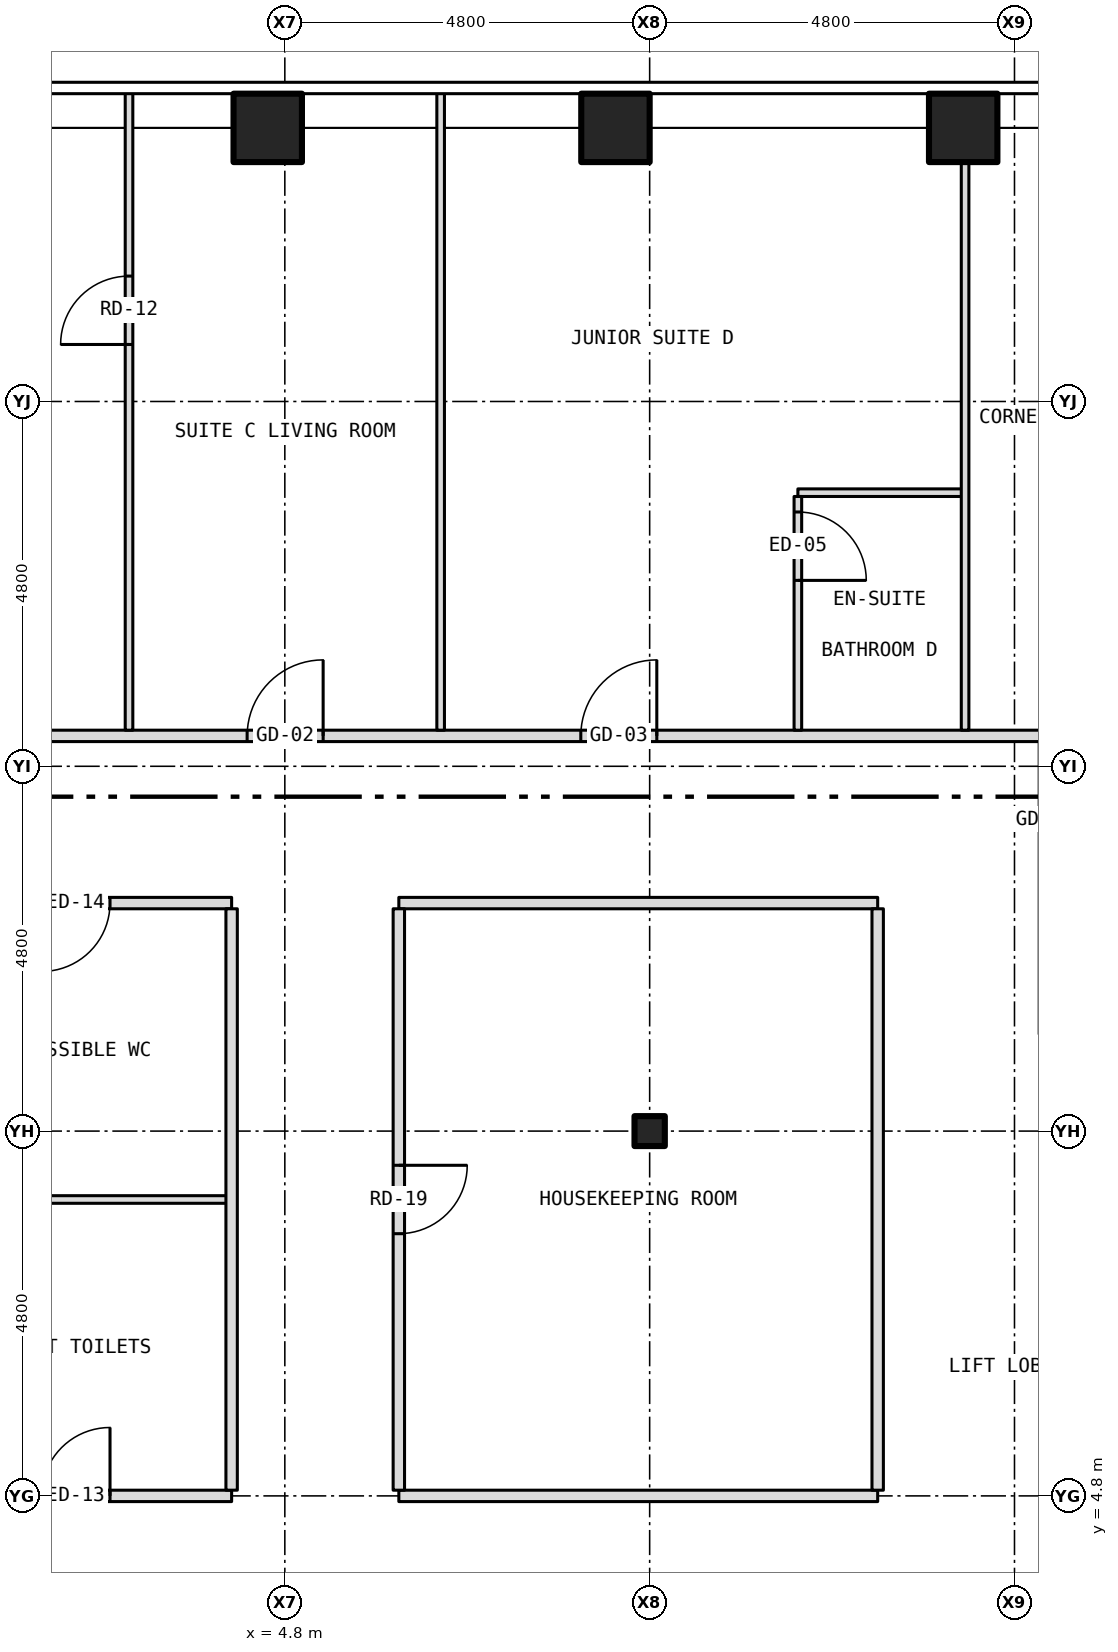
"""IFC4 building model, lengths in metres.
Left out: names, types, materials, properties, quantities, classifications, styles, units other than length and angle.
Written with IfcOpenShell. Run it as: python <this file> out.ifc"""

import sys

from ifc_helpers import new_model, si_unit, direction, frame, frame_2d, origin, origin_2d, place, context, subcontext, project, spatial, rectangle, hollow_rectangle, i_section, extrude, element, fill, save


model = new_model("IFC4")
c1 = context("Model", 3, precision=1e-05, world=origin(), true_north=direction((0.0, 1.0)))
c2 = subcontext(c1, "Body", "Model", "MODEL_VIEW")
j1 = project(units=[si_unit("LENGTHUNIT", "METRE"), si_unit("PLANEANGLEUNIT", "RADIAN")], contexts=[c1])
p1 = place(None, origin())
s1 = spatial("IfcSite", under=j1, at=p1, CompositionType="ELEMENT")
p2 = place(p1, origin())
s2 = spatial("IfcBuilding", under=s1, at=p2, CompositionType="ELEMENT")
p3 = place(p2, frame((0.0, 0.0, 110.0)))
s3 = spatial("IfcBuildingStorey", under=s2, at=p3, CompositionType="ELEMENT", Elevation=110.0)
for number, where, z_axis, x_axis in (
    (1, (4.575, 22.8, -0.15), (0.0, 0.0, 1.0), (1.0, 0.0, 0.0)),
    (2, (9.15, 22.8, -0.15), (0.0, 0.0, 1.0), (1.0, 0.0, 0.0)),
    (3, (13.725, 22.8, -0.15), (0.0, 0.0, 1.0), (1.0, 0.0, 0.0)),
):
    element("IfcColumn", number, at=place(p3, frame(where, z_axis=z_axis, x_axis=x_axis)), inside=s3, PredefinedType="COLUMN", context=c2, shape_type="SweptSolid", body=[
        extrude(hollow_rectangle(XDim=0.9, YDim=0.9, WallThickness=0.05, at=origin_2d()), origin(), (0.0, 0.0, 1.0), 3.5),
    ])
p4 = place(p3, frame((9.6, 9.6, -0.15), z_axis=(0.0, 0.0, 1.0), x_axis=(1.0, 0.0, 0.0)))
e4 = element("IfcColumn", 4, at=p4, inside=s3, PredefinedType="COLUMN", context=c2, shape_type="SweptSolid", body=[
    extrude(i_section(OverallWidth=0.399, OverallDepth=0.394, WebThickness=0.023, FlangeThickness=0.037, at=origin_2d()), origin(), (0.0, 0.0, 1.0), 3.5),
])
p5 = place(p3, frame((-12.6, 4.8, 0.0), z_axis=(0.0, 0.0, 1.0), x_axis=(1.0, 0.0, 0.0)))
e5 = element("IfcWall", 5, at=p5, inside=s3, PredefinedType="PARTITIONING", context=c2, shape_type="SweptSolid", body=[
    extrude(rectangle(XDim=16.7, YDim=0.15, at=frame_2d((8.35, 0.0))), origin(), (0.0, 0.0, 1.0), 3.35),
])
p6 = place(p5, frame((14.2, 0.0, 0.0)))
e6 = element("IfcOpeningElement", 6, at=p6, cuts=e5, PredefinedType="OPENING", context=c2, shape_type="SweptSolid", body=[
    extrude(rectangle(XDim=0.9, YDim=2.1, at=frame_2d((0.45, 1.05))), frame((0.0, 0.087, 0.0), z_axis=(0.0, -1.0, 0.0), x_axis=(1.0, 0.0, 0.0)), (0.0, 0.0, 1.0), 0.174),
])
p7 = place(p3, frame((6.3, 4.8, 0.0), z_axis=(0.0, 0.0, 1.0), x_axis=(1.0, 0.0, 0.0)))
e7 = element("IfcWall", 7, at=p7, inside=s3, PredefinedType="PARTITIONING", context=c2, shape_type="SweptSolid", body=[
    extrude(rectangle(XDim=6.3, YDim=0.15, at=frame_2d((3.15, 0.0))), origin(), (0.0, 0.0, 1.0), 3.35),
])
p8 = place(p3, frame((0.0, 8.7, 0.0), z_axis=(0.0, 0.0, 1.0), x_axis=(1.0, 0.0, 0.0)))
e8 = element("IfcWall", 8, at=p8, inside=s3, PredefinedType="PARTITIONING", context=c2, shape_type="SweptSolid", body=[
    extrude(rectangle(XDim=4.1, YDim=0.1, at=frame_2d((2.05, 0.0))), origin(), (0.0, 0.0, 1.0), 3.35),
])
p9 = place(p3, frame((-12.6, 12.6, 0.0), z_axis=(0.0, 0.0, 1.0), x_axis=(1.0, 0.0, 0.0)))
e9 = element("IfcWall", 9, at=p9, inside=s3, PredefinedType="PARTITIONING", context=c2, shape_type="SweptSolid", body=[
    extrude(rectangle(XDim=16.7, YDim=0.15, at=frame_2d((8.35, 0.0))), origin(), (0.0, 0.0, 1.0), 3.35),
])
p10 = place(p9, frame((14.2, 0.0, 0.0)))
e10 = element("IfcOpeningElement", 10, at=p10, cuts=e9, PredefinedType="OPENING", context=c2, shape_type="SweptSolid", body=[
    extrude(rectangle(XDim=0.9, YDim=2.1, at=frame_2d((0.45, 1.05))), frame((0.0, 0.087, 0.0), z_axis=(0.0, -1.0, 0.0), x_axis=(1.0, 0.0, 0.0)), (0.0, 0.0, 1.0), 0.174),
])
p11 = place(p9, frame((5.85, 0.0, 0.0)))
e11 = element("IfcOpeningElement", 11, at=p11, cuts=e9, PredefinedType="OPENING", context=c2, shape_type="SweptSolid", body=[
    extrude(rectangle(XDim=0.9, YDim=2.1, at=frame_2d((0.45, 1.05))), frame((0.0, 0.087, 0.0), z_axis=(0.0, -1.0, 0.0), x_axis=(1.0, 0.0, 0.0)), (0.0, 0.0, 1.0), 0.174),
])
p12 = place(p3, frame((6.3, 12.6, 0.0), z_axis=(0.0, 0.0, 1.0), x_axis=(1.0, 0.0, 0.0)))
e12 = element("IfcWall", 12, at=p12, inside=s3, PredefinedType="PARTITIONING", context=c2, shape_type="SweptSolid", body=[
    extrude(rectangle(XDim=6.3, YDim=0.15, at=frame_2d((3.15, 0.0))), origin(), (0.0, 0.0, 1.0), 3.35),
])
p13 = place(p3, frame((-14.8, 14.8, 0.0), z_axis=(0.0, 0.0, 1.0), x_axis=(1.0, 0.0, 0.0)))
e13 = element("IfcWall", 13, at=p13, inside=s3, PredefinedType="PARTITIONING", context=c2, shape_type="SweptSolid", body=[
    extrude(rectangle(XDim=29.6, YDim=0.15, at=frame_2d((14.8, 0.0))), origin(), (0.0, 0.0, 1.0), 3.35),
])
p14 = place(p13, frame((2.913, 0.0, 0.0)))
e14 = element("IfcOpeningElement", 14, at=p14, cuts=e13, PredefinedType="OPENING", context=c2, shape_type="SweptSolid", body=[
    extrude(rectangle(XDim=0.9, YDim=2.1, at=frame_2d((0.45, 1.05))), frame((0.0, 0.087, 0.0), z_axis=(0.0, -1.0, 0.0), x_axis=(1.0, 0.0, 0.0)), (0.0, 0.0, 1.0), 0.174),
])
p15 = place(p13, frame((7.481, 0.0, 0.0)))
e15 = element("IfcOpeningElement", 15, at=p15, cuts=e13, PredefinedType="OPENING", context=c2, shape_type="SweptSolid", body=[
    extrude(rectangle(XDim=1.0, YDim=2.1, at=frame_2d((0.5, 1.05))), frame((0.0, 0.087, 0.0), z_axis=(0.0, -1.0, 0.0), x_axis=(1.0, 0.0, 0.0)), (0.0, 0.0, 1.0), 0.174),
])
p16 = place(p13, frame((19.104, 0.0, 0.0)))
e16 = element("IfcOpeningElement", 16, at=p16, cuts=e13, PredefinedType="OPENING", context=c2, shape_type="SweptSolid", body=[
    extrude(rectangle(XDim=1.0, YDim=2.1, at=frame_2d((0.5, 1.05))), frame((0.0, 0.087, 0.0), z_axis=(0.0, -1.0, 0.0), x_axis=(1.0, 0.0, 0.0)), (0.0, 0.0, 1.0), 0.174),
])
p17 = place(p13, frame((23.494, 0.0, 0.0)))
e17 = element("IfcOpeningElement", 17, at=p17, cuts=e13, PredefinedType="OPENING", context=c2, shape_type="SweptSolid", body=[
    extrude(rectangle(XDim=1.0, YDim=2.1, at=frame_2d((0.5, 1.05))), frame((0.0, 0.087, 0.0), z_axis=(0.0, -1.0, 0.0), x_axis=(1.0, 0.0, 0.0)), (0.0, 0.0, 1.0), 0.174),
])
p18 = place(p3, frame((11.55, 18.0, 0.0), z_axis=(0.0, 0.0, 1.0), x_axis=(1.0, 0.0, 0.0)))
e18 = element("IfcWall", 18, at=p18, inside=s3, PredefinedType="PARTITIONING", context=c2, shape_type="SweptSolid", body=[
    extrude(rectangle(XDim=2.2, YDim=0.1, at=frame_2d((1.1, 0.0))), origin(), (0.0, 0.0, 1.0), 3.35),
])
p19 = place(p3, frame((2.75, 14.875, 0.0), z_axis=(0.0, 0.0, 1.0), x_axis=(0.0, 1.0, 0.0)))
e19 = element("IfcWall", 19, at=p19, inside=s3, PredefinedType="PARTITIONING", context=c2, shape_type="SweptSolid", body=[
    extrude(rectangle(XDim=8.405, YDim=0.1, at=frame_2d((4.203, 0.0))), origin(), (0.0, 0.0, 1.0), 3.35),
])
p20 = place(p19, frame((5.075, 0.0, 0.0)))
e20 = element("IfcOpeningElement", 20, at=p20, cuts=e19, PredefinedType="OPENING", context=c2, shape_type="SweptSolid", body=[
    extrude(rectangle(XDim=0.9, YDim=2.1, at=frame_2d((0.45, 1.05))), frame((0.0, 0.062, 0.0), z_axis=(0.0, -1.0, 0.0), x_axis=(1.0, 0.0, 0.0)), (0.0, 0.0, 1.0), 0.124),
])
p21 = place(p3, frame((4.1, 4.875, 0.0), z_axis=(0.0, 0.0, 1.0), x_axis=(0.0, 1.0, 0.0)))
e21 = element("IfcWall", 21, at=p21, inside=s3, PredefinedType="PARTITIONING", context=c2, shape_type="SweptSolid", body=[
    extrude(rectangle(XDim=7.65, YDim=0.15, at=frame_2d((3.825, 0.0))), origin(), (0.0, 0.0, 1.0), 3.35),
])
p22 = place(p3, frame((6.3, 4.875, 0.0), z_axis=(0.0, 0.0, 1.0), x_axis=(0.0, 1.0, 0.0)))
e22 = element("IfcWall", 22, at=p22, inside=s3, PredefinedType="PARTITIONING", context=c2, shape_type="SweptSolid", body=[
    extrude(rectangle(XDim=7.65, YDim=0.15, at=frame_2d((3.825, 0.0))), origin(), (0.0, 0.0, 1.0), 3.35),
])
p23 = place(p22, frame((3.375, 0.0, 0.0)))
e23 = element("IfcOpeningElement", 23, at=p23, cuts=e22, PredefinedType="OPENING", context=c2, shape_type="SweptSolid", body=[
    extrude(rectangle(XDim=0.9, YDim=2.1, at=frame_2d((0.45, 1.05))), frame((0.0, 0.087, 0.0), z_axis=(0.0, -1.0, 0.0), x_axis=(1.0, 0.0, 0.0)), (0.0, 0.0, 1.0), 0.174),
])
p24 = place(p3, frame((6.85, 14.875, 0.0), z_axis=(0.0, 0.0, 1.0), x_axis=(0.0, 1.0, 0.0)))
e24 = element("IfcWall", 24, at=p24, inside=s3, PredefinedType="PARTITIONING", context=c2, shape_type="SweptSolid", body=[
    extrude(rectangle(XDim=8.405, YDim=0.1, at=frame_2d((4.203, 0.0))), origin(), (0.0, 0.0, 1.0), 3.35),
])
p25 = place(p3, frame((11.55, 14.875, 0.0), z_axis=(0.0, 0.0, 1.0), x_axis=(0.0, 1.0, 0.0)))
e25 = element("IfcWall", 25, at=p25, inside=s3, PredefinedType="PARTITIONING", context=c2, shape_type="SweptSolid", body=[
    extrude(rectangle(XDim=3.075, YDim=0.1, at=frame_2d((1.538, 0.0))), origin(), (0.0, 0.0, 1.0), 3.35),
])
p26 = place(p25, frame((1.971, 0.0, 0.0)))
e26 = element("IfcOpeningElement", 26, at=p26, cuts=e25, PredefinedType="OPENING", context=c2, shape_type="SweptSolid", body=[
    extrude(rectangle(XDim=0.9, YDim=2.1, at=frame_2d((0.45, 1.05))), frame((0.0, 0.062, 0.0), z_axis=(0.0, -1.0, 0.0), x_axis=(1.0, 0.0, 0.0)), (0.0, 0.0, 1.0), 0.124),
])
p27 = place(p3, frame((12.6, 4.875, 0.0), z_axis=(0.0, 0.0, 1.0), x_axis=(0.0, 1.0, 0.0)))
e27 = element("IfcWall", 27, at=p27, inside=s3, PredefinedType="PARTITIONING", context=c2, shape_type="SweptSolid", body=[
    extrude(rectangle(XDim=7.65, YDim=0.15, at=frame_2d((3.825, 0.0))), origin(), (0.0, 0.0, 1.0), 3.35),
])
p28 = place(p3, frame((13.75, 14.875, 0.0), z_axis=(0.0, 0.0, 1.0), x_axis=(0.0, 1.0, 0.0)))
e28 = element("IfcWall", 28, at=p28, inside=s3, PredefinedType="PARTITIONING", context=c2, shape_type="SweptSolid", body=[
    extrude(rectangle(XDim=7.805, YDim=0.1, at=frame_2d((3.902, 0.0))), origin(), (0.0, 0.0, 1.0), 3.35),
])
p29 = place(p16, origin())
e29 = element("IfcDoor", 29, at=p29, inside=s3, OperationType="SINGLE_SWING_RIGHT", PredefinedType="DOOR", context=c2, shape_type="SweptSolid", body=[
    extrude(rectangle(XDim=1.0, YDim=2.1, at=frame_2d((0.5, 1.05))), frame((0.0, 0.025, 0.0), z_axis=(0.0, -1.0, 0.0), x_axis=(1.0, 0.0, 0.0)), (0.0, 0.0, 1.0), 0.05),
])
fill(e16, e29)
p30 = place(p20, origin())
e30 = element("IfcDoor", 30, at=p30, inside=s3, OperationType="SINGLE_SWING_LEFT", PredefinedType="DOOR", context=c2, shape_type="SweptSolid", body=[
    extrude(rectangle(XDim=0.9, YDim=2.1, at=frame_2d((0.45, 1.05))), frame((0.0, 0.025, 0.0), z_axis=(0.0, -1.0, 0.0), x_axis=(1.0, 0.0, 0.0)), (0.0, 0.0, 1.0), 0.05),
])
fill(e20, e30)
p31 = place(p17, origin())
e31 = element("IfcDoor", 31, at=p31, inside=s3, OperationType="SINGLE_SWING_RIGHT", PredefinedType="DOOR", context=c2, shape_type="SweptSolid", body=[
    extrude(rectangle(XDim=1.0, YDim=2.1, at=frame_2d((0.5, 1.05))), frame((0.0, 0.025, 0.0), z_axis=(0.0, -1.0, 0.0), x_axis=(1.0, 0.0, 0.0)), (0.0, 0.0, 1.0), 0.05),
])
fill(e17, e31)
p32 = place(p26, origin())
e32 = element("IfcDoor", 32, at=p32, inside=s3, OperationType="SINGLE_SWING_LEFT", PredefinedType="DOOR", context=c2, shape_type="SweptSolid", body=[
    extrude(rectangle(XDim=0.9, YDim=2.1, at=frame_2d((0.45, 1.05))), frame((0.0, 0.025, 0.0), z_axis=(0.0, -1.0, 0.0), x_axis=(1.0, 0.0, 0.0)), (0.0, 0.0, 1.0), 0.05),
])
fill(e26, e32)
p33 = place(p6, origin())
e33 = element("IfcDoor", 33, at=p33, inside=s3, OperationType="SINGLE_SWING_RIGHT", PredefinedType="DOOR", context=c2, shape_type="SweptSolid", body=[
    extrude(rectangle(XDim=0.9, YDim=2.1, at=frame_2d((0.45, 1.05))), frame((0.0, 0.025, 0.0), z_axis=(0.0, -1.0, 0.0), x_axis=(1.0, 0.0, 0.0)), (0.0, 0.0, 1.0), 0.05),
])
fill(e6, e33)
p34 = place(p10, origin())
e34 = element("IfcDoor", 34, at=p34, inside=s3, OperationType="SINGLE_SWING_LEFT", PredefinedType="DOOR", context=c2, shape_type="SweptSolid", body=[
    extrude(rectangle(XDim=0.9, YDim=2.1, at=frame_2d((0.45, 1.05))), frame((0.0, 0.025, 0.0), z_axis=(0.0, -1.0, 0.0), x_axis=(1.0, 0.0, 0.0)), (0.0, 0.0, 1.0), 0.05),
])
fill(e10, e34)
p35 = place(p23, origin())
e35 = element("IfcDoor", 35, at=p35, inside=s3, OperationType="SINGLE_SWING_RIGHT", PredefinedType="DOOR", context=c2, shape_type="SweptSolid", body=[
    extrude(rectangle(XDim=0.9, YDim=2.1, at=frame_2d((0.45, 1.05))), frame((0.0, 0.025, 0.0), z_axis=(0.0, -1.0, 0.0), x_axis=(1.0, 0.0, 0.0)), (0.0, 0.0, 1.0), 0.05),
])
fill(e23, e35)
save(model, sys.argv[1])
